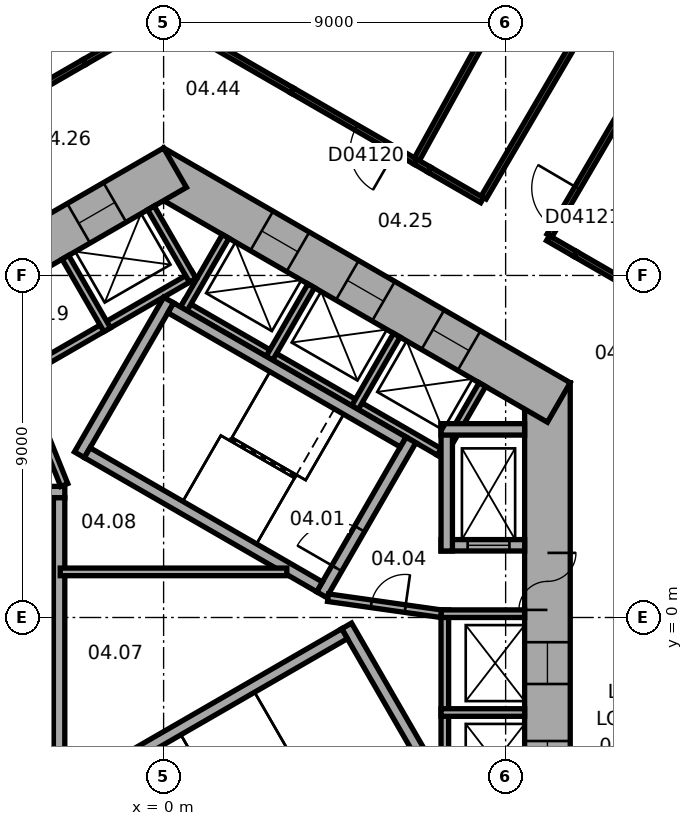
"""IFC4 building model, lengths in metres.
Left out: names, types, materials, properties, quantities, classifications, styles, units other than length and angle.
Written with IfcOpenShell. Run it as: python <this file> out.ifc"""

import sys

from ifc_helpers import new_model, si_unit, direction, frame, frame_2d, origin, place, context, subcontext, project, spatial, rectangle, extrude, element, fill, save


model = new_model("IFC4")
c1 = context("Model", 3, precision=1e-05, world=origin(), true_north=direction((0.0, 1.0)))
c2 = subcontext(c1, "Body", "Model", "MODEL_VIEW")
j1 = project(units=[si_unit("LENGTHUNIT", "METRE"), si_unit("PLANEANGLEUNIT", "RADIAN")], contexts=[c1])
p1 = place(None, origin())
s1 = spatial("IfcSite", under=j1, at=p1, CompositionType="ELEMENT")
p2 = place(p1, origin())
s2 = spatial("IfcBuilding", under=s1, at=p2, CompositionType="ELEMENT")
p3 = place(p2, frame((0.0, 0.0, 29.0)))
s3 = spatial("IfcBuildingStorey", under=s2, at=p3, CompositionType="ELEMENT", Elevation=29.0)
p4 = place(p3, frame((10.1, -6.177, 0.0), z_axis=(0.0, 0.0, 1.0), x_axis=(0.0, 1.0, 0.0)))
e1 = element("IfcWall", 1, at=p4, inside=s3, PredefinedType="SHEAR", context=c2, shape_type="SweptSolid", body=[
    extrude(rectangle(XDim=12.355, YDim=1.2, at=frame_2d((6.177, 0.0))), origin(), (0.0, 0.0, 1.0), 5.5),
])
p5 = place(p4, frame((6.378, 0.0, 0.0)))
e2 = element("IfcOpeningElement", 2, at=p5, cuts=e1, PredefinedType="OPENING", context=c2, shape_type="SweptSolid", body=[
    extrude(rectangle(XDim=1.5, YDim=2.1, at=frame_2d((0.75, 1.05))), frame((0.0, 0.61, 0.0), z_axis=(0.0, -1.0, 0.0), x_axis=(1.0, 0.0, 0.0)), (0.0, 0.0, 1.0), 1.22),
])
p6 = place(p4, frame((1.828, 0.0, 0.0)))
e3 = element("IfcOpeningElement", 3, at=p6, cuts=e1, PredefinedType="OPENING", context=c2, shape_type="SweptSolid", body=[
    extrude(rectangle(XDim=1.1, YDim=2.1, at=frame_2d((0.55, 1.05))), frame((0.0, 0.61, 0.0), z_axis=(0.0, -1.0, 0.0), x_axis=(1.0, 0.0, 0.0)), (0.0, 0.0, 1.0), 1.22),
])
p7 = place(p4, frame((4.427, 0.0, 0.0)))
e4 = element("IfcOpeningElement", 4, at=p7, cuts=e1, PredefinedType="OPENING", context=c2, shape_type="SweptSolid", body=[
    extrude(rectangle(XDim=1.1, YDim=2.1, at=frame_2d((0.55, 1.05))), frame((0.0, 0.61, 0.0), z_axis=(0.0, -1.0, 0.0), x_axis=(1.0, 0.0, 0.0)), (0.0, 0.0, 1.0), 1.22),
])
p8 = place(p3, frame((10.4, 5.658, 0.0), z_axis=(0.0, 0.0, 1.0), x_axis=(-0.866021384402, 0.500006961711, 0.0)))
e5 = element("IfcWall", 5, at=p8, inside=s3, PredefinedType="SHEAR", context=c2, shape_type="SweptSolid", body=[
    extrude(rectangle(XDim=12.355, YDim=1.2, at=frame_2d((6.178, 0.0))), origin(), (0.0, 0.0, 1.0), 5.5),
])
p9 = place(p8, frame((2.728, 0.0, 0.0)))
e6 = element("IfcOpeningElement", 6, at=p9, cuts=e5, PredefinedType="OPENING", context=c2, shape_type="SweptSolid", body=[
    extrude(rectangle(XDim=1.1, YDim=2.1, at=frame_2d((0.55, 1.05))), frame((0.0, 0.61, 0.0), z_axis=(0.0, -1.0, 0.0), x_axis=(1.0, 0.0, 0.0)), (0.0, 0.0, 1.0), 1.22),
])
p10 = place(p8, frame((5.328, 0.0, 0.0)))
e7 = element("IfcOpeningElement", 7, at=p10, cuts=e5, PredefinedType="OPENING", context=c2, shape_type="SweptSolid", body=[
    extrude(rectangle(XDim=1.1, YDim=2.1, at=frame_2d((0.55, 1.05))), frame((0.0, 0.61, 0.0), z_axis=(0.0, -1.0, 0.0), x_axis=(1.0, 0.0, 0.0)), (0.0, 0.0, 1.0), 1.22),
])
p11 = place(p8, frame((7.928, 0.0, 0.0)))
e8 = element("IfcOpeningElement", 8, at=p11, cuts=e5, PredefinedType="OPENING", context=c2, shape_type="SweptSolid", body=[
    extrude(rectangle(XDim=1.1, YDim=2.1, at=frame_2d((0.55, 1.05))), frame((0.0, 0.61, 0.0), z_axis=(0.0, -1.0, 0.0), x_axis=(1.0, 0.0, 0.0)), (0.0, 0.0, 1.0), 1.22),
])
p12 = place(p3, frame((0.3, 11.836, 0.0), z_axis=(0.0, 0.0, 1.0), x_axis=(-0.866021384402, -0.500006961711, 0.0)))
e9 = element("IfcWall", 9, at=p12, inside=s3, PredefinedType="SHEAR", context=c2, shape_type="SweptSolid", body=[
    extrude(rectangle(XDim=12.355, YDim=1.2, at=frame_2d((6.178, 0.0))), origin(), (0.0, 0.0, 1.0), 5.5),
])
p13 = place(p12, frame((6.378, 0.0, 0.0)))
e10 = element("IfcOpeningElement", 10, at=p13, cuts=e9, PredefinedType="OPENING", context=c2, shape_type="SweptSolid", body=[
    extrude(rectangle(XDim=1.5, YDim=2.1, at=frame_2d((0.75, 1.05))), frame((0.0, 0.61, 0.0), z_axis=(0.0, -1.0, 0.0), x_axis=(1.0, 0.0, 0.0)), (0.0, 0.0, 1.0), 1.22),
])
p14 = place(p12, frame((1.828, 0.0, 0.0)))
e11 = element("IfcOpeningElement", 11, at=p14, cuts=e9, PredefinedType="OPENING", context=c2, shape_type="SweptSolid", body=[
    extrude(rectangle(XDim=1.1, YDim=2.1, at=frame_2d((0.55, 1.05))), frame((0.0, 0.61, 0.0), z_axis=(0.0, -1.0, 0.0), x_axis=(1.0, 0.0, 0.0)), (0.0, 0.0, 1.0), 1.22),
])
p15 = place(p3, frame((7.4, -5.2, 0.0), z_axis=(0.0, 0.0, 1.0), x_axis=(0.0, 1.0, 0.0)))
e12 = element("IfcWall", 12, at=p15, inside=s3, PredefinedType="PARTITIONING", context=c2, shape_type="SweptSolid", body=[
    extrude(rectangle(XDim=5.4, YDim=0.2, at=frame_2d((2.7, 0.0))), origin(), (0.0, 0.0, 1.0), 5.15),
])
for number, where, z_axis, x_axis in (
    (13, (7.3, -2.5, 0.0), (0.0, 0.0, 1.0), (1.0, 0.0, 0.0)),
    (14, (7.3, 0.1, 0.0), (0.0, 0.0, 1.0), (1.0, 0.0, 0.0)),
):
    element("IfcWall", number, at=place(p3, frame(where, z_axis=z_axis, x_axis=x_axis)), inside=s3, PredefinedType="PARTITIONING", context=c2, shape_type="SweptSolid", body=[
        extrude(rectangle(XDim=2.2, YDim=0.2, at=frame_2d((1.1, 0.0))), origin(), (0.0, 0.0, 1.0), 5.15),
    ])
p16 = place(p3, frame((7.424, 4.259, 0.0), z_axis=(0.0, 0.0, 1.0), x_axis=(-0.866026010844, 0.49999894854, 0.0)))
e15 = element("IfcWall", 15, at=p16, inside=s3, PredefinedType="PARTITIONING", context=c2, shape_type="SweptSolid", body=[
    extrude(rectangle(XDim=8.0, YDim=0.2, at=frame_2d((4.0, 0.0))), origin(), (0.0, 0.0, 1.0), 5.15),
])
for number, where, z_axis, x_axis in (
    (16, (7.287, 4.222, 0.0), (0.0, 0.0, 1.0), (0.5, 0.866, 0.0)),
    (17, (5.036, 5.522, 0.0), (0.0, 0.0, 1.0), (0.5, 0.866, 0.0)),
    (18, (2.784, 6.822, 0.0), (0.0, 0.0, 1.0), (0.5, 0.866, 0.0)),
    (19, (0.532, 8.122, 0.0), (0.0, 0.0, 1.0), (0.5, 0.866, 0.0)),
):
    element("IfcWall", number, at=place(p3, frame(where, z_axis=z_axis, x_axis=x_axis)), inside=s3, PredefinedType="PARTITIONING", context=c2, shape_type="SweptSolid", body=[
        extrude(rectangle(XDim=2.2, YDim=0.2, at=frame_2d((1.1, 0.0))), origin(), (0.0, 0.0, 1.0), 5.15),
    ])
p17 = place(p3, frame((0.803, 9.009, 0.0), z_axis=(0.0, 0.0, 1.0), x_axis=(-0.866028230842, -0.499995103361, 0.0)))
e20 = element("IfcWall", 20, at=p17, inside=s3, PredefinedType="PARTITIONING", context=c2, shape_type="SweptSolid", body=[
    extrude(rectangle(XDim=5.4, YDim=0.2, at=frame_2d((2.7, 0.0))), origin(), (0.0, 0.0, 1.0), 5.15),
])
p18 = place(p3, frame((0.767, 8.872, 0.0), z_axis=(0.0, 0.0, 1.0), x_axis=(-0.499994660107, 0.866028486751, 0.0)))
e21 = element("IfcWall", 21, at=p18, inside=s3, PredefinedType="PARTITIONING", context=c2, shape_type="SweptSolid", body=[
    extrude(rectangle(XDim=2.2, YDim=0.2, at=frame_2d((1.1, 0.0))), origin(), (0.0, 0.0, 1.0), 5.15),
])
p19 = place(p3, frame((-1.485, 7.572, 0.0), z_axis=(0.0, 0.0, 1.0), x_axis=(-0.50002983664, 0.866008176907, 0.0)))
e22 = element("IfcWall", 22, at=p19, inside=s3, PredefinedType="PARTITIONING", context=c2, shape_type="SweptSolid", body=[
    extrude(rectangle(XDim=2.2, YDim=0.2, at=frame_2d((1.1, 0.0))), origin(), (0.0, 0.0, 1.0), 5.15),
])
p20 = place(p3, frame((4.158, 0.602, 0.0), z_axis=(0.0, 0.0, 1.0), x_axis=(0.499977259774, 0.866038532462, 0.0)))
e23 = element("IfcWall", 23, at=p20, inside=s3, PredefinedType="SHEAR", context=c2, shape_type="SweptSolid", body=[
    extrude(rectangle(XDim=4.7, YDim=0.3, at=frame_2d((2.35, 0.0))), origin(), (0.0, 0.0, 1.0), 5.15),
])
p21 = place(p20, frame((0.8, 0.0, 0.0)))
e24 = element("IfcOpeningElement", 24, at=p21, cuts=e23, PredefinedType="OPENING", context=c2, shape_type="SweptSolid", body=[
    extrude(rectangle(XDim=1.2, YDim=2.1, at=frame_2d((0.6, 1.05))), frame((0.0, 0.16, 0.0), z_axis=(0.0, -1.0, 0.0), x_axis=(1.0, 0.0, 0.0)), (0.0, 0.0, 1.0), 0.32),
])
p22 = place(p3, frame((-2.216, 4.282, 0.0), z_axis=(0.0, 0.0, 1.0), x_axis=(0.499977259774, 0.866038532462, 0.0)))
e25 = element("IfcWall", 25, at=p22, inside=s3, PredefinedType="SHEAR", context=c2, shape_type="SweptSolid", body=[
    extrude(rectangle(XDim=4.7, YDim=0.3, at=frame_2d((2.35, 0.0))), origin(), (0.0, 0.0, 1.0), 5.15),
])
for number, where, z_axis, x_axis in (
    (26, (4.103, 0.807, 0.0), (0.0, 0.0, 1.0), (-0.866, 0.5, 0.0)),
    (27, (6.303, 4.617, 0.0), (0.0, 0.0, 1.0), (-0.866, 0.5, 0.0)),
):
    element("IfcWall", number, at=place(p3, frame(where, z_axis=z_axis, x_axis=x_axis)), inside=s3, PredefinedType="SHEAR", context=c2, shape_type="SweptSolid", body=[
        extrude(rectangle(XDim=7.06, YDim=0.3, at=frame_2d((3.53, 0.0))), origin(), (0.0, 0.0, 1.0), 5.15),
    ])
p23 = place(p3, frame((-2.6, 3.3, 0.0), z_axis=(0.0, 0.0, 1.0), x_axis=(-1.0, 0.0, 0.0)))
e28 = element("IfcWall", 28, at=p23, inside=s3, PredefinedType="SHEAR", context=c2, shape_type="SweptSolid", body=[
    extrude(rectangle(XDim=4.7, YDim=0.3, at=frame_2d((2.35, 0.0))), origin(), (0.0, 0.0, 1.0), 5.15),
])
p24 = place(p23, frame((0.8, 0.0, 0.0)))
e29 = element("IfcOpeningElement", 29, at=p24, cuts=e28, PredefinedType="OPENING", context=c2, shape_type="SweptSolid", body=[
    extrude(rectangle(XDim=1.2, YDim=2.1, at=frame_2d((0.6, 1.05))), frame((0.0, 0.16, 0.0), z_axis=(0.0, -1.0, 0.0), x_axis=(1.0, 0.0, 0.0)), (0.0, 0.0, 1.0), 0.32),
])
p25 = place(p3, frame((-2.75, 3.15, 0.0), z_axis=(0.0, 0.0, 1.0), x_axis=(0.0, -1.0, 0.0)))
e30 = element("IfcWall", 30, at=p25, inside=s3, PredefinedType="SHEAR", context=c2, shape_type="SweptSolid", body=[
    extrude(rectangle(XDim=7.06, YDim=0.3, at=frame_2d((3.53, 0.0))), origin(), (0.0, 0.0, 1.0), 5.15),
])
p26 = place(p3, frame((4.816, -0.222, 0.0), z_axis=(0.0, 0.0, 1.0), x_axis=(0.499977259774, -0.866038532462, 0.0)))
e31 = element("IfcWall", 31, at=p26, inside=s3, PredefinedType="SHEAR", context=c2, shape_type="SweptSolid", body=[
    extrude(rectangle(XDim=4.7, YDim=0.3, at=frame_2d((2.35, 0.0))), origin(), (0.0, 0.0, 1.0), 5.15),
])
p27 = place(p3, frame((-1.353, -3.957, 0.0), z_axis=(0.0, 0.0, 1.0), x_axis=(0.866027801685, 0.499995846692, 0.0)))
e32 = element("IfcWall", 32, at=p27, inside=s3, PredefinedType="SHEAR", context=c2, shape_type="SweptSolid", body=[
    extrude(rectangle(XDim=7.06, YDim=0.3, at=frame_2d((3.53, 0.0))), origin(), (0.0, 0.0, 1.0), 5.15),
])
p28 = place(p3, frame((7.3, 1.9, 0.0), z_axis=(0.0, 0.0, 1.0), x_axis=(1.0, 0.0, 0.0)))
e33 = element("IfcWall", 33, at=p28, inside=s3, PredefinedType="SHEAR", context=c2, shape_type="SweptSolid", body=[
    extrude(rectangle(XDim=2.2, YDim=0.3, at=frame_2d((1.1, 0.0))), origin(), (0.0, 0.0, 1.0), 5.15),
])
p29 = place(p28, frame((0.7, 0.0, 0.0)))
e34 = element("IfcOpeningElement", 34, at=p29, cuts=e33, PredefinedType="OPENING", context=c2, shape_type="SweptSolid", body=[
    extrude(rectangle(XDim=1.1, YDim=2.1, at=frame_2d((0.55, 1.05))), frame((0.0, 0.16, 0.0), z_axis=(0.0, -1.0, 0.0), x_axis=(1.0, 0.0, 0.0)), (0.0, 0.0, 1.0), 0.32),
])
p30 = place(p3, frame((7.45, 1.75, 0.0), z_axis=(0.0, 0.0, 1.0), x_axis=(0.0, 1.0, 0.0)))
e35 = element("IfcWall", 35, at=p30, inside=s3, PredefinedType="SHEAR", context=c2, shape_type="SweptSolid", body=[
    extrude(rectangle(XDim=3.35, YDim=0.3, at=frame_2d((1.675, 0.0))), origin(), (0.0, 0.0, 1.0), 5.15),
])
p31 = place(p3, frame((7.3, 4.95, 0.0), z_axis=(0.0, 0.0, 1.0), x_axis=(1.0, 0.0, 0.0)))
e36 = element("IfcWall", 36, at=p31, inside=s3, PredefinedType="SHEAR", context=c2, shape_type="SweptSolid", body=[
    extrude(rectangle(XDim=2.2, YDim=0.3, at=frame_2d((1.1, 0.0))), origin(), (0.0, 0.0, 1.0), 5.15),
])
p32 = place(p3, frame((4.327, 0.521, 0.0), z_axis=(0.0, 0.0, 1.0), x_axis=(0.990124376366, -0.14019172346, 0.0)))
e37 = element("IfcWall", 37, at=p32, inside=s3, PredefinedType="PARTITIONING", context=c2, shape_type="SweptSolid", body=[
    extrude(rectangle(XDim=3.002, YDim=0.2, at=frame_2d((1.501, 0.0))), origin(), (0.0, 0.0, 1.0), 5.15),
])
p33 = place(p32, frame((1.15, 0.0, 0.0)))
e38 = element("IfcOpeningElement", 38, at=p33, cuts=e37, PredefinedType="OPENING", context=c2, shape_type="SweptSolid", body=[
    extrude(rectangle(XDim=0.9, YDim=2.1, at=frame_2d((0.45, 1.05))), frame((0.0, 0.11, 0.0), z_axis=(0.0, -1.0, 0.0), x_axis=(1.0, 0.0, 0.0)), (0.0, 0.0, 1.0), 0.22),
])
p34 = place(p3, frame((-2.615, 3.487, 0.0), z_axis=(0.0, 0.0, 1.0), x_axis=(-0.373576831041, 0.92759924068, 0.0)))
e39 = element("IfcWall", 39, at=p34, inside=s3, PredefinedType="PARTITIONING", context=c2, shape_type="SweptSolid", body=[
    extrude(rectangle(XDim=3.002, YDim=0.2, at=frame_2d((1.501, 0.0))), origin(), (0.0, 0.0, 1.0), 5.15),
])
p35 = place(p34, frame((1.15, 0.0, 0.0)))
e40 = element("IfcOpeningElement", 40, at=p35, cuts=e39, PredefinedType="OPENING", context=c2, shape_type="SweptSolid", body=[
    extrude(rectangle(XDim=0.9, YDim=2.1, at=frame_2d((0.45, 1.05))), frame((0.0, 0.11, 0.0), z_axis=(0.0, -1.0, 0.0), x_axis=(1.0, 0.0, 0.0)), (0.0, 0.0, 1.0), 0.22),
])
p36 = place(p3, frame((-2.72, 1.2, 0.0), z_axis=(0.0, 0.0, 1.0), x_axis=(1.0, 0.0, 0.0)))
e41 = element("IfcWall", 41, at=p36, inside=s3, PredefinedType="PARTITIONING", context=c2, shape_type="SweptSolid", body=[
    extrude(rectangle(XDim=5.961, YDim=0.2, at=frame_2d((2.981, 0.0))), origin(), (0.0, 0.0, 1.0), 5.15),
])
p37 = place(p3, frame((10.833, 9.564, 0.0), z_axis=(0.0, 0.0, 1.0), x_axis=(0.866091368387, -0.499885728548, 0.0)))
e42 = element("IfcWall", 42, at=p37, inside=s3, PredefinedType="PARTITIONING", context=c2, shape_type="SweptSolid", body=[
    extrude(rectangle(XDim=2.761, YDim=0.15, at=frame_2d((1.381, 0.0))), origin(), (0.0, 0.0, 1.0), 5.15),
])
p38 = place(p3, frame((10.114, 9.98, 0.0), z_axis=(0.0, 0.0, 1.0), x_axis=(0.865848115047, -0.500306947453, 0.0)))
e43 = element("IfcWall", 43, at=p38, inside=s3, PredefinedType="PARTITIONING", context=c2, shape_type="SweptSolid", body=[
    extrude(rectangle(XDim=0.832, YDim=0.15, at=frame_2d((0.416, 0.0))), origin(), (0.0, 0.0, 1.0), 5.15),
])
p39 = place(p3, frame((8.422, 11.05, 0.0), z_axis=(0.0, 0.0, 1.0), x_axis=(0.50561651199, 0.862758333952, 0.0)))
e44 = element("IfcWall", 44, at=p39, inside=s3, PredefinedType="PARTITIONING", context=c2, shape_type="SweptSolid", body=[
    extrude(rectangle(XDim=7.118, YDim=0.15, at=frame_2d((3.559, 0.0))), origin(), (0.0, 0.0, 1.0), 4.35),
])
p40 = place(p3, frame((6.995, 11.781, 0.0), z_axis=(0.0, 0.0, 1.0), x_axis=(0.866076391369, -0.499911676512, 0.0)))
e45 = element("IfcWall", 45, at=p40, inside=s3, PredefinedType="PARTITIONING", context=c2, shape_type="SweptSolid", body=[
    extrude(rectangle(XDim=1.601, YDim=0.15, at=frame_2d((0.8, 0.0))), origin(), (0.0, 0.0, 1.0), 5.15),
])
p41 = place(p3, frame((6.995, 11.781, 0.0), z_axis=(0.0, 0.0, 1.0), x_axis=(-0.866281716711, 0.49955578997, 0.0)))
e46 = element("IfcWall", 46, at=p41, inside=s3, PredefinedType="PARTITIONING", context=c2, shape_type="SweptSolid", body=[
    extrude(rectangle(XDim=0.423, YDim=0.15, at=frame_2d((0.211, 0.0))), origin(), (0.0, 0.0, 1.0), 5.15),
])
p42 = place(p3, frame((6.629, 11.992, 0.0), z_axis=(0.0, 0.0, 1.0), x_axis=(-0.86599558016, 0.500051652475, 0.0)))
e47 = element("IfcWall", 47, at=p42, inside=s3, PredefinedType="PARTITIONING", context=c2, shape_type="SweptSolid", body=[
    extrude(rectangle(XDim=3.745, YDim=0.15, at=frame_2d((1.872, 0.0))), origin(), (0.0, 0.0, 1.0), 5.15),
])
p43 = place(p42, frame((0.6, 0.0, 0.0)))
e48 = element("IfcOpeningElement", 48, at=p43, cuts=e47, PredefinedType="OPENING", context=c2, shape_type="SweptSolid", body=[
    extrude(rectangle(XDim=1.2, YDim=2.1, at=frame_2d((0.6, 1.05))), frame((0.0, 0.085, 0.0), z_axis=(0.0, -1.0, 0.0), x_axis=(1.0, 0.0, 0.0)), (0.0, 0.0, 1.0), 0.17),
])
p44 = place(p3, frame((6.668, 12.062, 0.0), z_axis=(0.0, 0.0, 1.0), x_axis=(0.483795376692, 0.875181143245, 0.0)))
e49 = element("IfcWall", 49, at=p44, inside=s3, PredefinedType="PARTITIONING", context=c2, shape_type="SweptSolid", body=[
    extrude(rectangle(XDim=7.387, YDim=0.15, at=frame_2d((3.693, 0.0))), origin(), (0.0, 0.0, 1.0), 5.15),
])
p45 = place(p3, frame((3.386, 13.865, 0.0), z_axis=(0.0, 0.0, 1.0), x_axis=(-0.866006051527, 0.500033517596, 0.0)))
e50 = element("IfcWall", 50, at=p45, inside=s3, PredefinedType="PARTITIONING", context=c2, shape_type="SweptSolid", body=[
    extrude(rectangle(XDim=3.85, YDim=0.15, at=frame_2d((1.925, 0.0))), origin(), (0.0, 0.0, 1.0), 5.15),
])
p46 = place(p3, frame((-2.087, 14.615, 0.0), z_axis=(0.0, 0.0, 1.0), x_axis=(-0.866054784643, -0.499949107407, 0.0)))
e51 = element("IfcWall", 51, at=p46, inside=s3, PredefinedType="PARTITIONING", context=c2, shape_type="SweptSolid", body=[
    extrude(rectangle(XDim=1.585, YDim=0.15, at=frame_2d((0.792, 0.0))), origin(), (0.0, 0.0, 1.0), 5.15),
])
p47 = place(p3, frame((-2.087, 14.615, 0.0), z_axis=(0.0, 0.0, 1.0), x_axis=(0.866006459158, 0.500032811619, 0.0)))
e52 = element("IfcWall", 52, at=p47, inside=s3, PredefinedType="PARTITIONING", context=c2, shape_type="SweptSolid", body=[
    extrude(rectangle(XDim=1.861, YDim=0.15, at=frame_2d((0.931, 0.0))), origin(), (0.0, 0.0, 1.0), 5.15),
])
p48 = place(p3, frame((13.772, 16.224, 0.0), z_axis=(0.0, 0.0, 1.0), x_axis=(-0.505547889018, -0.862798546539, 0.0)))
e53 = element("IfcWall", 53, at=p48, inside=s3, PredefinedType="PARTITIONING", context=c2, shape_type="SweptSolid", body=[
    extrude(rectangle(XDim=7.156, YDim=0.15, at=frame_2d((3.578, 0.0))), origin(), (0.0, 0.0, 1.0), 5.15),
])
p49 = place(p48, frame((5.706, 0.0, 0.0)))
e54 = element("IfcOpeningElement", 54, at=p49, cuts=e53, PredefinedType="OPENING", context=c2, shape_type="SweptSolid", body=[
    extrude(rectangle(XDim=1.2, YDim=2.1, at=frame_2d((0.6, 1.05))), frame((0.0, 0.085, 0.0), z_axis=(0.0, -1.0, 0.0), x_axis=(1.0, 0.0, 0.0)), (0.0, 0.0, 1.0), 0.17),
])
p50 = place(p5, origin())
e55 = element("IfcDoor", 55, at=p50, inside=s3, OperationType="DOUBLE_DOOR_SINGLE_SWING", PredefinedType="DOOR", context=c2, shape_type="SweptSolid", body=[
    extrude(rectangle(XDim=1.5, YDim=2.1, at=frame_2d((0.75, 1.05))), frame((0.0, 0.025, 0.0), z_axis=(0.0, -1.0, 0.0), x_axis=(1.0, 0.0, 0.0)), (0.0, 0.0, 1.0), 0.05),
])
fill(e2, e55)
p51 = place(p21, origin())
e56 = element("IfcDoor", 56, at=p51, inside=s3, OperationType="SINGLE_SWING_RIGHT", PredefinedType="DOOR", context=c2, shape_type="SweptSolid", body=[
    extrude(rectangle(XDim=1.2, YDim=2.1, at=frame_2d((0.6, 1.05))), frame((0.0, 0.025, 0.0), z_axis=(0.0, -1.0, 0.0), x_axis=(1.0, 0.0, 0.0)), (0.0, 0.0, 1.0), 0.05),
])
fill(e24, e56)
p52 = place(p33, origin())
e57 = element("IfcDoor", 57, at=p52, inside=s3, OperationType="SINGLE_SWING_LEFT", PredefinedType="DOOR", context=c2, shape_type="SweptSolid", body=[
    extrude(rectangle(XDim=0.9, YDim=2.1, at=frame_2d((0.45, 1.05))), frame((0.0, 0.025, 0.0), z_axis=(0.0, -1.0, 0.0), x_axis=(1.0, 0.0, 0.0)), (0.0, 0.0, 1.0), 0.05),
])
fill(e38, e57)
p53 = place(p29, origin())
e58 = element("IfcDoor", 58, at=p53, inside=s3, OperationType="DOUBLE_DOOR_SLIDING", PredefinedType="DOOR", context=c2, shape_type="SweptSolid", body=[
    extrude(rectangle(XDim=1.1, YDim=2.1, at=frame_2d((0.55, 1.05))), frame((0.0, 0.025, 0.0), z_axis=(0.0, -1.0, 0.0), x_axis=(1.0, 0.0, 0.0)), (0.0, 0.0, 1.0), 0.05),
])
fill(e34, e58)
p54 = place(p6, origin())
e59 = element("IfcDoor", 59, at=p54, inside=s3, OperationType="DOUBLE_DOOR_SLIDING", PredefinedType="DOOR", context=c2, shape_type="SweptSolid", body=[
    extrude(rectangle(XDim=1.1, YDim=2.1, at=frame_2d((0.55, 1.05))), frame((0.0, 0.025, 0.0), z_axis=(0.0, -1.0, 0.0), x_axis=(1.0, 0.0, 0.0)), (0.0, 0.0, 1.0), 0.05),
])
fill(e3, e59)
p55 = place(p7, origin())
e60 = element("IfcDoor", 60, at=p55, inside=s3, OperationType="DOUBLE_DOOR_SLIDING", PredefinedType="DOOR", context=c2, shape_type="SweptSolid", body=[
    extrude(rectangle(XDim=1.1, YDim=2.1, at=frame_2d((0.55, 1.05))), frame((0.0, 0.025, 0.0), z_axis=(0.0, -1.0, 0.0), x_axis=(1.0, 0.0, 0.0)), (0.0, 0.0, 1.0), 0.05),
])
fill(e4, e60)
p56 = place(p9, origin())
e61 = element("IfcDoor", 61, at=p56, inside=s3, OperationType="DOUBLE_DOOR_SLIDING", PredefinedType="DOOR", context=c2, shape_type="SweptSolid", body=[
    extrude(rectangle(XDim=1.1, YDim=2.1, at=frame_2d((0.55, 1.05))), frame((0.0, 0.025, 0.0), z_axis=(0.0, -1.0, 0.0), x_axis=(1.0, 0.0, 0.0)), (0.0, 0.0, 1.0), 0.05),
])
fill(e6, e61)
p57 = place(p10, origin())
e62 = element("IfcDoor", 62, at=p57, inside=s3, OperationType="DOUBLE_DOOR_SLIDING", PredefinedType="DOOR", context=c2, shape_type="SweptSolid", body=[
    extrude(rectangle(XDim=1.1, YDim=2.1, at=frame_2d((0.55, 1.05))), frame((0.0, 0.025, 0.0), z_axis=(0.0, -1.0, 0.0), x_axis=(1.0, 0.0, 0.0)), (0.0, 0.0, 1.0), 0.05),
])
fill(e7, e62)
p58 = place(p11, origin())
e63 = element("IfcDoor", 63, at=p58, inside=s3, OperationType="DOUBLE_DOOR_SLIDING", PredefinedType="DOOR", context=c2, shape_type="SweptSolid", body=[
    extrude(rectangle(XDim=1.1, YDim=2.1, at=frame_2d((0.55, 1.05))), frame((0.0, 0.025, 0.0), z_axis=(0.0, -1.0, 0.0), x_axis=(1.0, 0.0, 0.0)), (0.0, 0.0, 1.0), 0.05),
])
fill(e8, e63)
p59 = place(p14, origin())
e64 = element("IfcDoor", 64, at=p59, inside=s3, OperationType="DOUBLE_DOOR_SLIDING", PredefinedType="DOOR", context=c2, shape_type="SweptSolid", body=[
    extrude(rectangle(XDim=1.1, YDim=2.1, at=frame_2d((0.55, 1.05))), frame((0.0, 0.025, 0.0), z_axis=(0.0, -1.0, 0.0), x_axis=(1.0, 0.0, 0.0)), (0.0, 0.0, 1.0), 0.05),
])
fill(e11, e64)
p60 = place(p43, origin())
e65 = element("IfcDoor", 65, at=p60, inside=s3, OperationType="SINGLE_SWING_LEFT", PredefinedType="DOOR", context=c2, shape_type="SweptSolid", body=[
    extrude(rectangle(XDim=1.2, YDim=2.1, at=frame_2d((0.6, 1.05))), frame((0.0, 0.025, 0.0), z_axis=(0.0, -1.0, 0.0), x_axis=(1.0, 0.0, 0.0)), (0.0, 0.0, 1.0), 0.05),
])
fill(e48, e65)
p61 = place(p49, origin())
e66 = element("IfcDoor", 66, at=p61, inside=s3, OperationType="SINGLE_SWING_LEFT", PredefinedType="DOOR", context=c2, shape_type="SweptSolid", body=[
    extrude(rectangle(XDim=1.2, YDim=2.1, at=frame_2d((0.6, 1.05))), frame((0.0, 0.025, 0.0), z_axis=(0.0, -1.0, 0.0), x_axis=(1.0, 0.0, 0.0)), (0.0, 0.0, 1.0), 0.05),
])
fill(e54, e66)
save(model, sys.argv[1])
